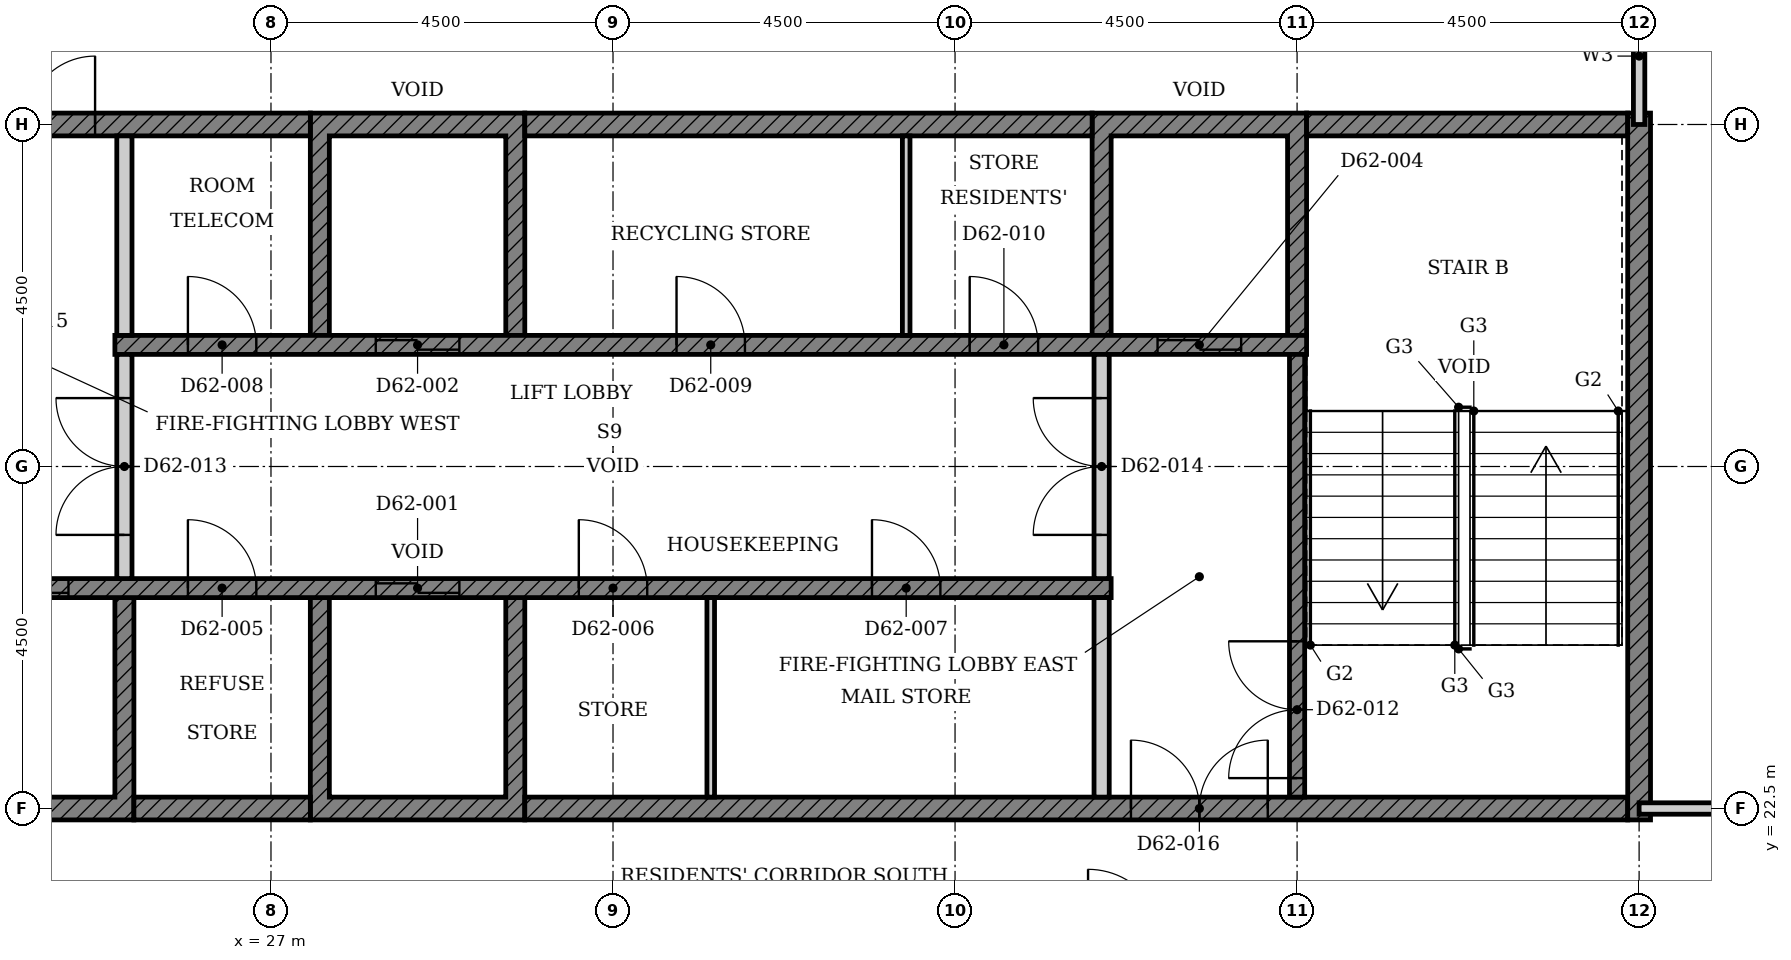
"""IFC4 building model, lengths in metres.
Left out: names, types, materials, properties, quantities, classifications, styles, units other than length and angle.
Written with IfcOpenShell. Run it as: python <this file> out.ifc"""

import sys

from ifc_helpers import new_model, si_unit, direction, frame, frame_2d, origin, place, context, subcontext, project, spatial, polyline, rectangle, outline, extrude, element, fill, save


model = new_model("IFC4")
c1 = context("Model", 3, precision=1e-05, world=origin(), true_north=direction((0.0, 1.0)))
c2 = subcontext(c1, "Body", "Model", "MODEL_VIEW")
j1 = project(units=[si_unit("LENGTHUNIT", "METRE"), si_unit("PLANEANGLEUNIT", "RADIAN")], contexts=[c1])
p1 = place(None, origin())
s1 = spatial("IfcSite", under=j1, at=p1, CompositionType="ELEMENT")
p2 = place(p1, origin())
s2 = spatial("IfcBuilding", under=s1, at=p2, CompositionType="ELEMENT")
p3 = place(p2, frame((0.0, 0.0, 245.3)))
s3 = spatial("IfcBuildingStorey", under=s2, at=p3, CompositionType="ELEMENT", Elevation=245.3)
p4 = place(p3, origin())
e1 = element("IfcWall", 1, at=p4, inside=s3, PredefinedType="SHEAR", context=c2, shape_type="SweptSolid", body=[
    extrude(outline(polyline([(22.375, 22.35), (25.197, 22.35), (25.197, 25.275), (24.947, 25.275), (24.947, 22.65), (22.625, 22.65), (22.625, 25.275), (22.375, 25.275), (22.375, 22.35)])), origin(), (0.0, 0.0, 1.0), 3.4),
])
p5 = place(p3, origin())
e2 = element("IfcWall", 2, at=p5, inside=s3, PredefinedType="SHEAR", context=c2, shape_type="SweptSolid", body=[
    extrude(outline(polyline([(27.518, 22.35), (30.339, 22.35), (30.339, 25.275), (30.089, 25.275), (30.089, 22.65), (27.768, 22.65), (27.768, 25.275), (27.518, 25.275), (27.518, 22.35)])), origin(), (0.0, 0.0, 1.0), 3.4),
])
p6 = place(p3, origin())
e3 = element("IfcWall", 3, at=p6, inside=s3, PredefinedType="SHEAR", context=c2, shape_type="SweptSolid", body=[
    extrude(outline(polyline([(27.518, 28.725), (27.768, 28.725), (27.768, 31.35), (30.089, 31.35), (30.089, 28.725), (30.339, 28.725), (30.339, 31.65), (27.518, 31.65), (27.518, 28.725)])), origin(), (0.0, 0.0, 1.0), 3.4),
])
p7 = place(p3, origin())
e4 = element("IfcWall", 4, at=p7, inside=s3, PredefinedType="SHEAR", context=c2, shape_type="SweptSolid", body=[
    extrude(outline(polyline([(37.803, 28.725), (38.053, 28.725), (38.053, 31.35), (40.375, 31.35), (40.375, 28.725), (40.625, 28.725), (40.625, 31.65), (37.803, 31.65), (37.803, 28.725)])), origin(), (0.0, 0.0, 1.0), 3.4),
])
p8 = place(p3, frame((25.197, 22.5, 0.0), z_axis=(0.0, 0.0, 1.0), x_axis=(1.0, 0.0, 0.0)))
e5 = element("IfcWall", 5, at=p8, inside=s3, PredefinedType="SHEAR", context=c2, shape_type="SweptSolid", body=[
    extrude(rectangle(XDim=2.321, YDim=0.3, at=frame_2d((1.161, 0.0))), origin(), (0.0, 0.0, 1.0), 3.4),
])
p9 = place(p3, frame((30.339, 22.5, 0.0), z_axis=(0.0, 0.0, 1.0), x_axis=(1.0, 0.0, 0.0)))
e6 = element("IfcWall", 6, at=p9, inside=s3, PredefinedType="SHEAR", context=c2, shape_type="SweptSolid", body=[
    extrude(rectangle(XDim=14.511, YDim=0.3, at=frame_2d((7.255, 0.0))), origin(), (0.0, 0.0, 1.0), 3.4),
])
p10 = place(p9, frame((7.975, 0.0, 0.0)))
e7 = element("IfcOpeningElement", 7, at=p10, cuts=e6, PredefinedType="OPENING", context=c2, shape_type="SweptSolid", body=[
    extrude(rectangle(XDim=1.8, YDim=2.1, at=frame_2d((0.9, 1.05))), frame((0.0, 0.16, 0.0), z_axis=(0.0, -1.0, 0.0), x_axis=(1.0, 0.0, 0.0)), (0.0, 0.0, 1.0), 0.32),
])
p11 = place(p3, frame((18.15, 31.5, 0.0), z_axis=(0.0, 0.0, 1.0), x_axis=(1.0, 0.0, 0.0)))
e8 = element("IfcWall", 8, at=p11, inside=s3, PredefinedType="SHEAR", context=c2, shape_type="SweptSolid", body=[
    extrude(rectangle(XDim=9.368, YDim=0.3, at=frame_2d((4.684, 0.0))), origin(), (0.0, 0.0, 1.0), 3.4),
])
p12 = place(p11, frame((4.736, 0.0, 0.0)))
e9 = element("IfcOpeningElement", 9, at=p12, cuts=e8, PredefinedType="OPENING", context=c2, shape_type="SweptSolid", body=[
    extrude(rectangle(XDim=1.8, YDim=2.1, at=frame_2d((0.9, 1.05))), frame((0.0, 0.16, 0.0), z_axis=(0.0, -1.0, 0.0), x_axis=(1.0, 0.0, 0.0)), (0.0, 0.0, 1.0), 0.32),
])
p13 = place(p3, frame((30.339, 31.5, 0.0), z_axis=(0.0, 0.0, 1.0), x_axis=(1.0, 0.0, 0.0)))
e10 = element("IfcWall", 10, at=p13, inside=s3, PredefinedType="SHEAR", context=c2, shape_type="SweptSolid", body=[
    extrude(rectangle(XDim=7.464, YDim=0.3, at=frame_2d((3.732, 0.0))), origin(), (0.0, 0.0, 1.0), 3.4),
])
p14 = place(p3, frame((40.625, 31.5, 0.0), z_axis=(0.0, 0.0, 1.0), x_axis=(1.0, 0.0, 0.0)))
e11 = element("IfcWall", 11, at=p14, inside=s3, PredefinedType="SHEAR", context=c2, shape_type="SweptSolid", body=[
    extrude(rectangle(XDim=4.225, YDim=0.3, at=frame_2d((2.113, 0.0))), origin(), (0.0, 0.0, 1.0), 3.4),
])
p15 = place(p3, frame((45.0, 22.35, 0.0), z_axis=(0.0, 0.0, 1.0), x_axis=(0.0, 1.0, 0.0)))
e12 = element("IfcWall", 12, at=p15, inside=s3, PredefinedType="SHEAR", context=c2, shape_type="SweptSolid", body=[
    extrude(rectangle(XDim=9.3, YDim=0.3, at=frame_2d((4.65, 0.0))), origin(), (0.0, 0.0, 1.0), 3.4),
])
p16 = place(p3, frame((22.375, 25.4, 0.0), z_axis=(0.0, 0.0, 1.0), x_axis=(1.0, 0.0, 0.0)))
e13 = element("IfcWall", 13, at=p16, inside=s3, PredefinedType="SHEAR", context=c2, shape_type="SweptSolid", body=[
    extrude(rectangle(XDim=15.678, YDim=0.25, at=frame_2d((7.839, 0.0))), origin(), (0.0, 0.0, 1.0), 3.4),
])
p17 = place(p16, frame((6.004, 0.0, 0.0)))
e14 = element("IfcOpeningElement", 14, at=p17, cuts=e13, PredefinedType="OPENING", context=c2, shape_type="SweptSolid", body=[
    extrude(rectangle(XDim=1.1, YDim=2.1, at=frame_2d((0.55, 1.05))), frame((0.0, 0.135, 0.0), z_axis=(0.0, -1.0, 0.0), x_axis=(1.0, 0.0, 0.0)), (0.0, 0.0, 1.0), 0.27),
])
p18 = place(p16, frame((0.861, 0.0, 0.0)))
e15 = element("IfcOpeningElement", 15, at=p18, cuts=e13, PredefinedType="OPENING", context=c2, shape_type="SweptSolid", body=[
    extrude(rectangle(XDim=1.1, YDim=2.1, at=frame_2d((0.55, 1.05))), frame((0.0, 0.135, 0.0), z_axis=(0.0, -1.0, 0.0), x_axis=(1.0, 0.0, 0.0)), (0.0, 0.0, 1.0), 0.27),
])
p19 = place(p16, frame((3.532, 0.0, 0.0)))
e16 = element("IfcOpeningElement", 16, at=p19, cuts=e13, PredefinedType="OPENING", context=c2, shape_type="SweptSolid", body=[
    extrude(rectangle(XDim=0.9, YDim=2.1, at=frame_2d((0.45, 1.05))), frame((0.0, 0.135, 0.0), z_axis=(0.0, -1.0, 0.0), x_axis=(1.0, 0.0, 0.0)), (0.0, 0.0, 1.0), 0.27),
])
p20 = place(p16, frame((8.675, 0.0, 0.0)))
e17 = element("IfcOpeningElement", 17, at=p20, cuts=e13, PredefinedType="OPENING", context=c2, shape_type="SweptSolid", body=[
    extrude(rectangle(XDim=0.9, YDim=2.1, at=frame_2d((0.45, 1.05))), frame((0.0, 0.135, 0.0), z_axis=(0.0, -1.0, 0.0), x_axis=(1.0, 0.0, 0.0)), (0.0, 0.0, 1.0), 0.27),
])
p21 = place(p16, frame((12.532, 0.0, 0.0)))
e18 = element("IfcOpeningElement", 18, at=p21, cuts=e13, PredefinedType="OPENING", context=c2, shape_type="SweptSolid", body=[
    extrude(rectangle(XDim=0.9, YDim=2.1, at=frame_2d((0.45, 1.05))), frame((0.0, 0.135, 0.0), z_axis=(0.0, -1.0, 0.0), x_axis=(1.0, 0.0, 0.0)), (0.0, 0.0, 1.0), 0.27),
])
p22 = place(p3, frame((24.947, 28.6, 0.0), z_axis=(0.0, 0.0, 1.0), x_axis=(1.0, 0.0, 0.0)))
e19 = element("IfcWall", 19, at=p22, inside=s3, PredefinedType="SHEAR", context=c2, shape_type="SweptSolid", body=[
    extrude(rectangle(XDim=15.678, YDim=0.25, at=frame_2d((7.839, 0.0))), origin(), (0.0, 0.0, 1.0), 3.4),
])
p23 = place(p22, frame((3.432, 0.0, 0.0)))
e20 = element("IfcOpeningElement", 20, at=p23, cuts=e19, PredefinedType="OPENING", context=c2, shape_type="SweptSolid", body=[
    extrude(rectangle(XDim=1.1, YDim=2.1, at=frame_2d((0.55, 1.05))), frame((0.0, 0.135, 0.0), z_axis=(0.0, -1.0, 0.0), x_axis=(1.0, 0.0, 0.0)), (0.0, 0.0, 1.0), 0.27),
])
p24 = place(p22, frame((13.718, 0.0, 0.0)))
e21 = element("IfcOpeningElement", 21, at=p24, cuts=e19, PredefinedType="OPENING", context=c2, shape_type="SweptSolid", body=[
    extrude(rectangle(XDim=1.1, YDim=2.1, at=frame_2d((0.55, 1.05))), frame((0.0, 0.135, 0.0), z_axis=(0.0, -1.0, 0.0), x_axis=(1.0, 0.0, 0.0)), (0.0, 0.0, 1.0), 0.27),
])
p25 = place(p22, frame((0.961, 0.0, 0.0)))
e22 = element("IfcOpeningElement", 22, at=p25, cuts=e19, PredefinedType="OPENING", context=c2, shape_type="SweptSolid", body=[
    extrude(rectangle(XDim=0.9, YDim=2.1, at=frame_2d((0.45, 1.05))), frame((0.0, 0.135, 0.0), z_axis=(0.0, -1.0, 0.0), x_axis=(1.0, 0.0, 0.0)), (0.0, 0.0, 1.0), 0.27),
])
p26 = place(p22, frame((7.389, 0.0, 0.0)))
e23 = element("IfcOpeningElement", 23, at=p26, cuts=e19, PredefinedType="OPENING", context=c2, shape_type="SweptSolid", body=[
    extrude(rectangle(XDim=0.9, YDim=2.1, at=frame_2d((0.45, 1.05))), frame((0.0, 0.135, 0.0), z_axis=(0.0, -1.0, 0.0), x_axis=(1.0, 0.0, 0.0)), (0.0, 0.0, 1.0), 0.27),
])
p27 = place(p22, frame((11.246, 0.0, 0.0)))
e24 = element("IfcOpeningElement", 24, at=p27, cuts=e19, PredefinedType="OPENING", context=c2, shape_type="SweptSolid", body=[
    extrude(rectangle(XDim=0.9, YDim=2.1, at=frame_2d((0.45, 1.05))), frame((0.0, 0.135, 0.0), z_axis=(0.0, -1.0, 0.0), x_axis=(1.0, 0.0, 0.0)), (0.0, 0.0, 1.0), 0.27),
])
p28 = place(p3, frame((37.928, 22.65, 0.0), z_axis=(0.0, 0.0, 1.0), x_axis=(0.0, 1.0, 0.0)))
e25 = element("IfcWall", 25, at=p28, inside=s3, PredefinedType="PARTITIONING", context=c2, shape_type="SweptSolid", body=[
    extrude(rectangle(XDim=2.625, YDim=0.2, at=frame_2d((1.312, 0.0))), origin(), (0.0, 0.0, 1.0), 3.4),
])
p29 = place(p3, frame((32.786, 22.65, 0.0), z_axis=(0.0, 0.0, 1.0), x_axis=(0.0, 1.0, 0.0)))
e26 = element("IfcWall", 26, at=p29, inside=s3, PredefinedType="PARTITIONING", context=c2, shape_type="SweptSolid", body=[
    extrude(rectangle(XDim=2.625, YDim=0.1, at=frame_2d((1.312, 0.0))), origin(), (0.0, 0.0, 1.0), 3.4),
])
p30 = place(p3, frame((25.072, 28.725, 0.0), z_axis=(0.0, 0.0, 1.0), x_axis=(0.0, 1.0, 0.0)))
e27 = element("IfcWall", 27, at=p30, inside=s3, PredefinedType="PARTITIONING", context=c2, shape_type="SweptSolid", body=[
    extrude(rectangle(XDim=2.625, YDim=0.2, at=frame_2d((1.312, 0.0))), origin(), (0.0, 0.0, 1.0), 3.4),
])
p31 = place(p3, frame((35.357, 28.725, 0.0), z_axis=(0.0, 0.0, 1.0), x_axis=(0.0, 1.0, 0.0)))
e28 = element("IfcWall", 28, at=p31, inside=s3, PredefinedType="PARTITIONING", context=c2, shape_type="SweptSolid", body=[
    extrude(rectangle(XDim=2.625, YDim=0.1, at=frame_2d((1.312, 0.0))), origin(), (0.0, 0.0, 1.0), 3.4),
])
p32 = place(p3, frame((40.5, 22.65, 0.0), z_axis=(0.0, 0.0, 1.0), x_axis=(0.0, 1.0, 0.0)))
e29 = element("IfcWall", 29, at=p32, inside=s3, PredefinedType="SHEAR", context=c2, shape_type="SweptSolid", body=[
    extrude(rectangle(XDim=5.825, YDim=0.2, at=frame_2d((2.913, 0.0))), origin(), (0.0, 0.0, 1.0), 3.4),
])
p33 = place(p32, frame((0.25, 0.0, 0.0)))
e30 = element("IfcOpeningElement", 30, at=p33, cuts=e29, PredefinedType="OPENING", context=c2, shape_type="SweptSolid", body=[
    extrude(rectangle(XDim=1.8, YDim=2.1, at=frame_2d((0.9, 1.05))), frame((0.0, 0.11, 0.0), z_axis=(0.0, -1.0, 0.0), x_axis=(1.0, 0.0, 0.0)), (0.0, 0.0, 1.0), 0.22),
])
p34 = place(p3, frame((25.072, 25.525, 0.0), z_axis=(0.0, 0.0, 1.0), x_axis=(0.0, 1.0, 0.0)))
e31 = element("IfcWall", 31, at=p34, inside=s3, PredefinedType="PARTITIONING", context=c2, shape_type="SweptSolid", body=[
    extrude(rectangle(XDim=2.95, YDim=0.2, at=frame_2d((1.475, 0.0))), origin(), (0.0, 0.0, 1.0), 3.4),
])
p35 = place(p34, frame((0.575, 0.0, 0.0)))
e32 = element("IfcOpeningElement", 32, at=p35, cuts=e31, PredefinedType="OPENING", context=c2, shape_type="SweptSolid", body=[
    extrude(rectangle(XDim=1.8, YDim=2.1, at=frame_2d((0.9, 1.05))), frame((0.0, 0.11, 0.0), z_axis=(0.0, -1.0, 0.0), x_axis=(1.0, 0.0, 0.0)), (0.0, 0.0, 1.0), 0.22),
])
p36 = place(p3, frame((37.928, 25.525, 0.0), z_axis=(0.0, 0.0, 1.0), x_axis=(0.0, 1.0, 0.0)))
e33 = element("IfcWall", 33, at=p36, inside=s3, PredefinedType="PARTITIONING", context=c2, shape_type="SweptSolid", body=[
    extrude(rectangle(XDim=2.95, YDim=0.2, at=frame_2d((1.475, 0.0))), origin(), (0.0, 0.0, 1.0), 3.4),
])
p37 = place(p36, frame((0.575, 0.0, 0.0)))
e34 = element("IfcOpeningElement", 34, at=p37, cuts=e33, PredefinedType="OPENING", context=c2, shape_type="SweptSolid", body=[
    extrude(rectangle(XDim=1.8, YDim=2.1, at=frame_2d((0.9, 1.05))), frame((0.0, 0.11, 0.0), z_axis=(0.0, -1.0, 0.0), x_axis=(1.0, 0.0, 0.0)), (0.0, 0.0, 1.0), 0.22),
])
p38 = place(p3, frame((45.0, 22.5, 0.0), z_axis=(0.0, 0.0, 1.0), x_axis=(1.0, 0.0, 0.0)))
e35 = element("IfcWall", 35, at=p38, inside=s3, PredefinedType="PARTITIONING", context=c2, shape_type="SweptSolid", body=[
    extrude(rectangle(XDim=4.74, YDim=0.15, at=frame_2d((2.37, 0.0))), origin(), (0.0, 0.0, 1.0), 3.4),
])
p39 = place(p38, frame((1.75, 0.0, 0.0)))
e36 = element("IfcOpeningElement", 36, at=p39, cuts=e35, PredefinedType="OPENING", context=c2, shape_type="SweptSolid", body=[
    extrude(rectangle(XDim=1.0, YDim=2.2, at=frame_2d((0.5, 1.1))), frame((0.0, 0.085, 0.0), z_axis=(0.0, -1.0, 0.0), x_axis=(1.0, 0.0, 0.0)), (0.0, 0.0, 1.0), 0.17),
])
p40 = place(p3, frame((45.0, 31.5, 0.0), z_axis=(0.0, 0.0, 1.0), x_axis=(0.0, 1.0, 0.0)))
e37 = element("IfcWall", 37, at=p40, inside=s3, PredefinedType="PARTITIONING", context=c2, shape_type="SweptSolid", body=[
    extrude(rectangle(XDim=1.8, YDim=0.15, at=frame_2d((0.9, 0.0))), origin(), (0.0, 0.0, 1.0), 3.4),
])
p41 = place(p17, origin())
e38 = element("IfcDoor", 38, at=p41, inside=s3, OperationType="DOUBLE_DOOR_SLIDING", PredefinedType="DOOR", context=c2, shape_type="SweptSolid", body=[
    extrude(rectangle(XDim=1.1, YDim=2.1, at=frame_2d((0.55, 1.05))), frame((0.0, 0.025, 0.0), z_axis=(0.0, -1.0, 0.0), x_axis=(1.0, 0.0, 0.0)), (0.0, 0.0, 1.0), 0.05),
])
fill(e14, e38)
p42 = place(p23, origin())
e39 = element("IfcDoor", 39, at=p42, inside=s3, OperationType="DOUBLE_DOOR_SLIDING", PredefinedType="DOOR", context=c2, shape_type="SweptSolid", body=[
    extrude(rectangle(XDim=1.1, YDim=2.1, at=frame_2d((0.55, 1.05))), frame((0.0, 0.025, 0.0), z_axis=(0.0, -1.0, 0.0), x_axis=(1.0, 0.0, 0.0)), (0.0, 0.0, 1.0), 0.05),
])
fill(e20, e39)
p43 = place(p18, origin())
e40 = element("IfcDoor", 40, at=p43, inside=s3, OperationType="DOUBLE_DOOR_SLIDING", PredefinedType="DOOR", context=c2, shape_type="SweptSolid", body=[
    extrude(rectangle(XDim=1.1, YDim=2.1, at=frame_2d((0.55, 1.05))), frame((0.0, 0.025, 0.0), z_axis=(0.0, -1.0, 0.0), x_axis=(1.0, 0.0, 0.0)), (0.0, 0.0, 1.0), 0.05),
])
fill(e15, e40)
p44 = place(p24, origin())
e41 = element("IfcDoor", 41, at=p44, inside=s3, OperationType="DOUBLE_DOOR_SLIDING", PredefinedType="DOOR", context=c2, shape_type="SweptSolid", body=[
    extrude(rectangle(XDim=1.1, YDim=2.1, at=frame_2d((0.55, 1.05))), frame((0.0, 0.025, 0.0), z_axis=(0.0, -1.0, 0.0), x_axis=(1.0, 0.0, 0.0)), (0.0, 0.0, 1.0), 0.05),
])
fill(e21, e41)
p45 = place(p19, origin())
e42 = element("IfcDoor", 42, at=p45, inside=s3, OperationType="SINGLE_SWING_LEFT", PredefinedType="DOOR", context=c2, shape_type="SweptSolid", body=[
    extrude(rectangle(XDim=0.9, YDim=2.1, at=frame_2d((0.45, 1.05))), frame((0.0, 0.025, 0.0), z_axis=(0.0, -1.0, 0.0), x_axis=(1.0, 0.0, 0.0)), (0.0, 0.0, 1.0), 0.05),
])
fill(e16, e42)
p46 = place(p20, origin())
e43 = element("IfcDoor", 43, at=p46, inside=s3, OperationType="SINGLE_SWING_LEFT", PredefinedType="DOOR", context=c2, shape_type="SweptSolid", body=[
    extrude(rectangle(XDim=0.9, YDim=2.1, at=frame_2d((0.45, 1.05))), frame((0.0, 0.025, 0.0), z_axis=(0.0, -1.0, 0.0), x_axis=(1.0, 0.0, 0.0)), (0.0, 0.0, 1.0), 0.05),
])
fill(e17, e43)
p47 = place(p21, origin())
e44 = element("IfcDoor", 44, at=p47, inside=s3, OperationType="SINGLE_SWING_LEFT", PredefinedType="DOOR", context=c2, shape_type="SweptSolid", body=[
    extrude(rectangle(XDim=0.9, YDim=2.1, at=frame_2d((0.45, 1.05))), frame((0.0, 0.025, 0.0), z_axis=(0.0, -1.0, 0.0), x_axis=(1.0, 0.0, 0.0)), (0.0, 0.0, 1.0), 0.05),
])
fill(e18, e44)
p48 = place(p25, origin())
e45 = element("IfcDoor", 45, at=p48, inside=s3, OperationType="SINGLE_SWING_LEFT", PredefinedType="DOOR", context=c2, shape_type="SweptSolid", body=[
    extrude(rectangle(XDim=0.9, YDim=2.1, at=frame_2d((0.45, 1.05))), frame((0.0, 0.025, 0.0), z_axis=(0.0, -1.0, 0.0), x_axis=(1.0, 0.0, 0.0)), (0.0, 0.0, 1.0), 0.05),
])
fill(e22, e45)
p49 = place(p26, origin())
e46 = element("IfcDoor", 46, at=p49, inside=s3, OperationType="SINGLE_SWING_LEFT", PredefinedType="DOOR", context=c2, shape_type="SweptSolid", body=[
    extrude(rectangle(XDim=0.9, YDim=2.1, at=frame_2d((0.45, 1.05))), frame((0.0, 0.025, 0.0), z_axis=(0.0, -1.0, 0.0), x_axis=(1.0, 0.0, 0.0)), (0.0, 0.0, 1.0), 0.05),
])
fill(e23, e46)
p50 = place(p27, origin())
e47 = element("IfcDoor", 47, at=p50, inside=s3, OperationType="SINGLE_SWING_LEFT", PredefinedType="DOOR", context=c2, shape_type="SweptSolid", body=[
    extrude(rectangle(XDim=0.9, YDim=2.1, at=frame_2d((0.45, 1.05))), frame((0.0, 0.025, 0.0), z_axis=(0.0, -1.0, 0.0), x_axis=(1.0, 0.0, 0.0)), (0.0, 0.0, 1.0), 0.05),
])
fill(e24, e47)
p51 = place(p33, origin())
e48 = element("IfcDoor", 48, at=p51, inside=s3, OperationType="DOUBLE_DOOR_SINGLE_SWING", PredefinedType="DOOR", context=c2, shape_type="SweptSolid", body=[
    extrude(rectangle(XDim=1.8, YDim=2.1, at=frame_2d((0.9, 1.05))), frame((0.0, 0.025, 0.0), z_axis=(0.0, -1.0, 0.0), x_axis=(1.0, 0.0, 0.0)), (0.0, 0.0, 1.0), 0.05),
])
fill(e30, e48)
p52 = place(p35, origin())
e49 = element("IfcDoor", 49, at=p52, inside=s3, OperationType="DOUBLE_DOOR_SINGLE_SWING", PredefinedType="DOOR", context=c2, shape_type="SweptSolid", body=[
    extrude(rectangle(XDim=1.8, YDim=2.1, at=frame_2d((0.9, 1.05))), frame((0.0, 0.025, 0.0), z_axis=(0.0, -1.0, 0.0), x_axis=(1.0, 0.0, 0.0)), (0.0, 0.0, 1.0), 0.05),
])
fill(e32, e49)
p53 = place(p37, origin())
e50 = element("IfcDoor", 50, at=p53, inside=s3, OperationType="DOUBLE_DOOR_SINGLE_SWING", PredefinedType="DOOR", context=c2, shape_type="SweptSolid", body=[
    extrude(rectangle(XDim=1.8, YDim=2.1, at=frame_2d((0.9, 1.05))), frame((0.0, 0.025, 0.0), z_axis=(0.0, -1.0, 0.0), x_axis=(1.0, 0.0, 0.0)), (0.0, 0.0, 1.0), 0.05),
])
fill(e34, e50)
p54 = place(p12, origin())
e51 = element("IfcDoor", 51, at=p54, inside=s3, OperationType="DOUBLE_DOOR_SINGLE_SWING", PredefinedType="DOOR", context=c2, shape_type="SweptSolid", body=[
    extrude(rectangle(XDim=1.8, YDim=2.1, at=frame_2d((0.9, 1.05))), frame((0.0, 0.025, 0.0), z_axis=(0.0, -1.0, 0.0), x_axis=(1.0, 0.0, 0.0)), (0.0, 0.0, 1.0), 0.05),
])
fill(e9, e51)
p55 = place(p10, origin())
e52 = element("IfcDoor", 52, at=p55, inside=s3, OperationType="DOUBLE_DOOR_SINGLE_SWING", PredefinedType="DOOR", context=c2, shape_type="SweptSolid", body=[
    extrude(rectangle(XDim=1.8, YDim=2.1, at=frame_2d((0.9, 1.05))), frame((0.0, 0.025, 0.0), z_axis=(0.0, -1.0, 0.0), x_axis=(1.0, 0.0, 0.0)), (0.0, 0.0, 1.0), 0.05),
])
fill(e7, e52)
save(model, sys.argv[1])
